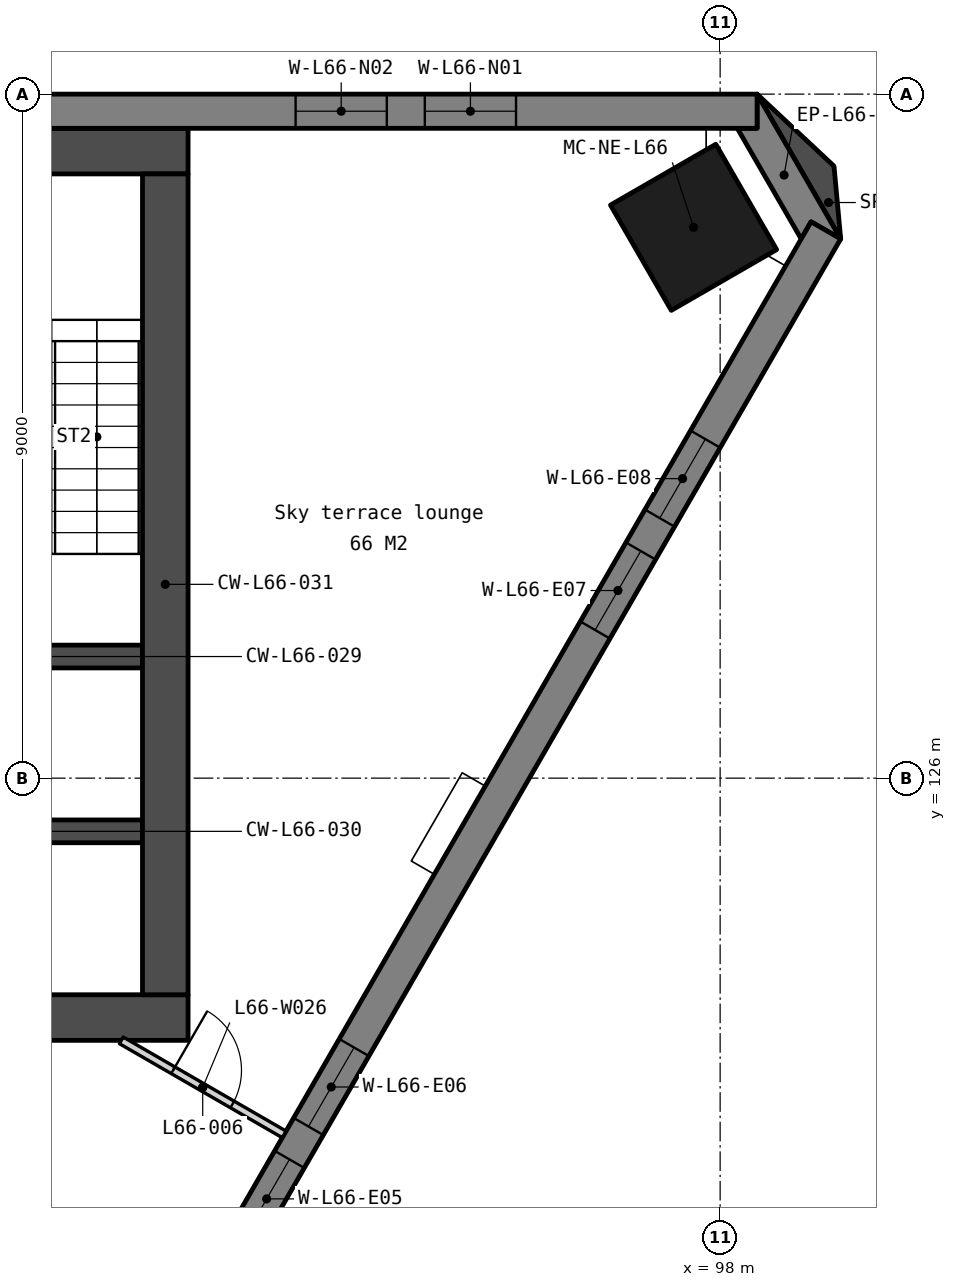
"""IFC4 building model, lengths in metres.
Left out: names, types, materials, properties, quantities, classifications, styles, units other than length and angle.
Written with IfcOpenShell. Run it as: python <this file> out.ifc"""

import sys

from ifc_helpers import new_model, si_unit, direction, frame, frame_2d, origin, origin_2d, place, context, subcontext, project, spatial, polyline, rectangle, outline, extrude, element, fill, save


model = new_model("IFC4")
c1 = context("Model", 3, precision=1e-05, world=origin(), true_north=direction((0.0, 1.0)))
c2 = subcontext(c1, "Body", "Model", "MODEL_VIEW")
j1 = project(units=[si_unit("LENGTHUNIT", "METRE"), si_unit("PLANEANGLEUNIT", "RADIAN")], contexts=[c1])
p1 = place(None, origin())
s1 = spatial("IfcSite", under=j1, at=p1, CompositionType="ELEMENT")
p2 = place(p1, origin())
s2 = spatial("IfcBuilding", under=s1, at=p2, CompositionType="ELEMENT")
p3 = place(p2, frame((0.0, 0.0, 269.9)))
s3 = spatial("IfcBuildingStorey", under=s2, at=p3, CompositionType="ELEMENT", Elevation=269.9)
p4 = place(p3, frame((97.651, 133.247, 0.0), z_axis=(0.0, 0.0, 1.0), x_axis=(-0.5, 0.866025403784, 0.0)))
e1 = element("IfcColumn", 1, at=p4, inside=s3, PredefinedType="COLUMN", context=c2, shape_type="SweptSolid", body=[
    extrude(rectangle(XDim=1.6, YDim=1.6, at=origin_2d()), origin(), (0.0, 0.0, 1.0), 3.9),
])
p5 = place(p3, frame((69.0, 134.25, 0.0), z_axis=(0.0, 0.0, 1.0), x_axis=(1.0, 0.0, 0.0)))
e2 = element("IfcWall", 2, at=p5, inside=s3, PredefinedType="SOLIDWALL", context=c2, shape_type="SweptSolid", body=[
    extrude(rectangle(XDim=22.0, YDim=0.6, at=frame_2d((11.0, 0.0))), origin(), (0.0, 0.0, 1.0), 3.75),
])
p6 = place(p3, frame((69.0, 122.85, 0.0), z_axis=(0.0, 0.0, 1.0), x_axis=(1.0, 0.0, 0.0)))
e3 = element("IfcWall", 3, at=p6, inside=s3, PredefinedType="SOLIDWALL", context=c2, shape_type="SweptSolid", body=[
    extrude(rectangle(XDim=22.0, YDim=0.6, at=frame_2d((11.0, 0.0))), origin(), (0.0, 0.0, 1.0), 3.75),
])
p7 = place(p6, frame((16.375, 0.0, 0.0)))
e4 = element("IfcOpeningElement", 4, at=p7, cuts=e3, PredefinedType="OPENING", context=c2, shape_type="SweptSolid", body=[
    extrude(rectangle(XDim=1.8, YDim=2.1, at=frame_2d((0.9, 1.05))), frame((0.0, 0.31, 0.0), z_axis=(0.0, -1.0, 0.0), x_axis=(1.0, 0.0, 0.0)), (0.0, 0.0, 1.0), 0.62),
])
p8 = place(p6, frame((3.825, 0.0, 0.0)))
e5 = element("IfcOpeningElement", 5, at=p8, cuts=e3, PredefinedType="OPENING", context=c2, shape_type="SweptSolid", body=[
    extrude(rectangle(XDim=1.8, YDim=2.1, at=frame_2d((0.9, 1.05))), frame((0.0, 0.31, 0.0), z_axis=(0.0, -1.0, 0.0), x_axis=(1.0, 0.0, 0.0)), (0.0, 0.0, 1.0), 0.62),
])
p9 = place(p6, frame((12.85, 0.0, 0.0)))
e6 = element("IfcOpeningElement", 6, at=p9, cuts=e3, PredefinedType="OPENING", context=c2, shape_type="SweptSolid", body=[
    extrude(rectangle(XDim=1.5, YDim=2.1, at=frame_2d((0.75, 1.05))), frame((0.0, 0.31, 0.0), z_axis=(0.0, -1.0, 0.0), x_axis=(1.0, 0.0, 0.0)), (0.0, 0.0, 1.0), 0.62),
])
for number, where, z_axis, x_axis in (
    (7, (87.85, 127.6, 0.0), (0.0, 0.0, 1.0), (1.0, 0.0, 0.0)),
    (8, (87.85, 125.3, 0.0), (0.0, 0.0, 1.0), (1.0, 0.0, 0.0)),
):
    element("IfcWall", number, at=place(p3, frame(where, z_axis=z_axis, x_axis=x_axis)), inside=s3, PredefinedType="SOLIDWALL", context=c2, shape_type="SweptSolid", body=[
        extrude(rectangle(XDim=2.55, YDim=0.3, at=frame_2d((1.275, 0.0))), origin(), (0.0, 0.0, 1.0), 3.75),
    ])
p10 = place(p3, frame((90.7, 133.95, 0.0), z_axis=(0.0, 0.0, 1.0), x_axis=(0.0, -1.0, 0.0)))
e9 = element("IfcWall", 9, at=p10, inside=s3, PredefinedType="SOLIDWALL", context=c2, shape_type="SweptSolid", body=[
    extrude(rectangle(XDim=10.8, YDim=0.6, at=frame_2d((5.4, 0.0))), origin(), (0.0, 0.0, 1.0), 3.75),
])
p11 = place(p3, frame((0.0, 0.0, -0.15)))
e10 = element("IfcWall", 10, at=p11, inside=s3, PredefinedType="SOLIDWALL", context=c2, shape_type="SweptSolid", body=[
    extrude(outline(polyline([(99.586, 133.095), (99.197, 133.32), (99.067, 133.095), (98.226, 134.55), (98.486, 134.55), (98.486, 135.0), (99.586, 133.095)])), origin(), (0.0, 0.0, 1.0), 3.9),
])
p12 = place(p3, frame((98.486, 134.775, -0.15), z_axis=(0.0, 0.0, 1.0), x_axis=(-1.0, 0.0, 0.0)))
e11 = element("IfcWall", 11, at=p12, inside=s3, PredefinedType="SOLIDWALL", context=c2, shape_type="SweptSolid", body=[
    extrude(outline(polyline([(36.972, 0.0), (36.972, 3.9), (0.0, 3.9), (0.0, 0.0), (36.972, 0.0)])), frame((0.0, 0.225, 0.0), z_axis=(0.0, -1.0, 0.0), x_axis=(1.0, 0.0, 0.0)), (0.0, 0.0, 1.0), 0.45),
])
p13 = place(p12, frame((3.172, 0.0, 0.95)))
e12 = element("IfcOpeningElement", 12, at=p13, cuts=e11, PredefinedType="OPENING", context=c2, shape_type="SweptSolid", body=[
    extrude(rectangle(XDim=1.2, YDim=2.2, at=frame_2d((0.6, 1.1))), frame((0.0, 0.235, 0.0), z_axis=(0.0, -1.0, 0.0), x_axis=(1.0, 0.0, 0.0)), (0.0, 0.0, 1.0), 0.47),
])
p14 = place(p12, frame((4.872, 0.0, 0.95)))
e13 = element("IfcOpeningElement", 13, at=p14, cuts=e11, PredefinedType="OPENING", context=c2, shape_type="SweptSolid", body=[
    extrude(rectangle(XDim=1.2, YDim=2.2, at=frame_2d((0.6, 1.1))), frame((0.0, 0.235, 0.0), z_axis=(0.0, -1.0, 0.0), x_axis=(1.0, 0.0, 0.0)), (0.0, 0.0, 1.0), 0.47),
])
p15 = place(p12, frame((12.415, 0.0, 0.95)))
e14 = element("IfcOpeningElement", 14, at=p15, cuts=e11, PredefinedType="OPENING", context=c2, shape_type="SweptSolid", body=[
    extrude(rectangle(XDim=1.2, YDim=2.2, at=frame_2d((0.6, 1.1))), frame((0.0, 0.235, 0.0), z_axis=(0.0, -1.0, 0.0), x_axis=(1.0, 0.0, 0.0)), (0.0, 0.0, 1.0), 0.47),
])
p16 = place(p12, frame((14.115, 0.0, 0.95)))
e15 = element("IfcOpeningElement", 15, at=p16, cuts=e11, PredefinedType="OPENING", context=c2, shape_type="SweptSolid", body=[
    extrude(rectangle(XDim=1.2, YDim=2.2, at=frame_2d((0.6, 1.1))), frame((0.0, 0.235, 0.0), z_axis=(0.0, -1.0, 0.0), x_axis=(1.0, 0.0, 0.0)), (0.0, 0.0, 1.0), 0.47),
])
p17 = place(p12, frame((21.658, 0.0, 0.95)))
e16 = element("IfcOpeningElement", 16, at=p17, cuts=e11, PredefinedType="OPENING", context=c2, shape_type="SweptSolid", body=[
    extrude(rectangle(XDim=1.2, YDim=2.2, at=frame_2d((0.6, 1.1))), frame((0.0, 0.235, 0.0), z_axis=(0.0, -1.0, 0.0), x_axis=(1.0, 0.0, 0.0)), (0.0, 0.0, 1.0), 0.47),
])
p18 = place(p12, frame((23.358, 0.0, 0.95)))
e17 = element("IfcOpeningElement", 17, at=p18, cuts=e11, PredefinedType="OPENING", context=c2, shape_type="SweptSolid", body=[
    extrude(rectangle(XDim=1.2, YDim=2.2, at=frame_2d((0.6, 1.1))), frame((0.0, 0.235, 0.0), z_axis=(0.0, -1.0, 0.0), x_axis=(1.0, 0.0, 0.0)), (0.0, 0.0, 1.0), 0.47),
])
p19 = place(p12, frame((30.901, 0.0, 0.95)))
e18 = element("IfcOpeningElement", 18, at=p19, cuts=e11, PredefinedType="OPENING", context=c2, shape_type="SweptSolid", body=[
    extrude(rectangle(XDim=1.2, YDim=2.2, at=frame_2d((0.6, 1.1))), frame((0.0, 0.235, 0.0), z_axis=(0.0, -1.0, 0.0), x_axis=(1.0, 0.0, 0.0)), (0.0, 0.0, 1.0), 0.47),
])
p20 = place(p12, frame((32.601, 0.0, 0.95)))
e19 = element("IfcOpeningElement", 19, at=p20, cuts=e11, PredefinedType="OPENING", context=c2, shape_type="SweptSolid", body=[
    extrude(rectangle(XDim=1.2, YDim=2.2, at=frame_2d((0.6, 1.1))), frame((0.0, 0.235, 0.0), z_axis=(0.0, -1.0, 0.0), x_axis=(1.0, 0.0, 0.0)), (0.0, 0.0, 1.0), 0.47),
])
p21 = place(p3, frame((80.905, 101.188, -0.15), z_axis=(0.0, 0.0, 1.0), x_axis=(0.500002536638, 0.866023939251, 0.0)))
e20 = element("IfcWall", 20, at=p21, inside=s3, PredefinedType="SOLIDWALL", context=c2, shape_type="SweptSolid", body=[
    extrude(outline(polyline([(36.972, 0.0), (36.972, 3.9), (0.0, 3.9), (0.0, 0.0), (36.972, 0.0)])), frame((0.0, 0.225, 0.0), z_axis=(0.0, -1.0, 0.0), x_axis=(1.0, 0.0, 0.0)), (0.0, 0.0, 1.0), 0.45),
])
p22 = place(p21, frame((3.172, 0.0, 0.95)))
e21 = element("IfcOpeningElement", 21, at=p22, cuts=e20, PredefinedType="OPENING", context=c2, shape_type="SweptSolid", body=[
    extrude(rectangle(XDim=1.2, YDim=2.2, at=frame_2d((0.6, 1.1))), frame((0.0, 0.235, 0.0), z_axis=(0.0, -1.0, 0.0), x_axis=(1.0, 0.0, 0.0)), (0.0, 0.0, 1.0), 0.47),
])
p23 = place(p21, frame((4.872, 0.0, 0.95)))
e22 = element("IfcOpeningElement", 22, at=p23, cuts=e20, PredefinedType="OPENING", context=c2, shape_type="SweptSolid", body=[
    extrude(rectangle(XDim=1.2, YDim=2.2, at=frame_2d((0.6, 1.1))), frame((0.0, 0.235, 0.0), z_axis=(0.0, -1.0, 0.0), x_axis=(1.0, 0.0, 0.0)), (0.0, 0.0, 1.0), 0.47),
])
p24 = place(p21, frame((12.415, 0.0, 0.95)))
e23 = element("IfcOpeningElement", 23, at=p24, cuts=e20, PredefinedType="OPENING", context=c2, shape_type="SweptSolid", body=[
    extrude(rectangle(XDim=1.2, YDim=2.2, at=frame_2d((0.6, 1.1))), frame((0.0, 0.235, 0.0), z_axis=(0.0, -1.0, 0.0), x_axis=(1.0, 0.0, 0.0)), (0.0, 0.0, 1.0), 0.47),
])
p25 = place(p21, frame((14.115, 0.0, 0.95)))
e24 = element("IfcOpeningElement", 24, at=p25, cuts=e20, PredefinedType="OPENING", context=c2, shape_type="SweptSolid", body=[
    extrude(rectangle(XDim=1.2, YDim=2.2, at=frame_2d((0.6, 1.1))), frame((0.0, 0.235, 0.0), z_axis=(0.0, -1.0, 0.0), x_axis=(1.0, 0.0, 0.0)), (0.0, 0.0, 1.0), 0.47),
])
p26 = place(p21, frame((21.658, 0.0, 0.95)))
e25 = element("IfcOpeningElement", 25, at=p26, cuts=e20, PredefinedType="OPENING", context=c2, shape_type="SweptSolid", body=[
    extrude(rectangle(XDim=1.2, YDim=2.2, at=frame_2d((0.6, 1.1))), frame((0.0, 0.235, 0.0), z_axis=(0.0, -1.0, 0.0), x_axis=(1.0, 0.0, 0.0)), (0.0, 0.0, 1.0), 0.47),
])
p27 = place(p21, frame((23.358, 0.0, 0.95)))
e26 = element("IfcOpeningElement", 26, at=p27, cuts=e20, PredefinedType="OPENING", context=c2, shape_type="SweptSolid", body=[
    extrude(rectangle(XDim=1.2, YDim=2.2, at=frame_2d((0.6, 1.1))), frame((0.0, 0.235, 0.0), z_axis=(0.0, -1.0, 0.0), x_axis=(1.0, 0.0, 0.0)), (0.0, 0.0, 1.0), 0.47),
])
p28 = place(p21, frame((30.901, 0.0, 0.95)))
e27 = element("IfcOpeningElement", 27, at=p28, cuts=e20, PredefinedType="OPENING", context=c2, shape_type="SweptSolid", body=[
    extrude(rectangle(XDim=1.2, YDim=2.2, at=frame_2d((0.6, 1.1))), frame((0.0, 0.235, 0.0), z_axis=(0.0, -1.0, 0.0), x_axis=(1.0, 0.0, 0.0)), (0.0, 0.0, 1.0), 0.47),
])
p29 = place(p21, frame((32.601, 0.0, 0.95)))
e28 = element("IfcOpeningElement", 28, at=p29, cuts=e20, PredefinedType="OPENING", context=c2, shape_type="SweptSolid", body=[
    extrude(rectangle(XDim=1.2, YDim=2.2, at=frame_2d((0.6, 1.1))), frame((0.0, 0.235, 0.0), z_axis=(0.0, -1.0, 0.0), x_axis=(1.0, 0.0, 0.0)), (0.0, 0.0, 1.0), 0.47),
])
p30 = place(p3, frame((0.0, 0.0, -0.15)))
e29 = element("IfcWall", 29, at=p30, inside=s3, PredefinedType="SOLIDWALL", context=c2, shape_type="SweptSolid", body=[
    extrude(outline(polyline([(99.586, 133.095), (99.498, 134.052), (98.486, 135.0), (99.586, 133.095)])), origin(), (0.0, 0.0, 1.0), 3.9),
])
p31 = place(p3, frame((90.121, 122.55, 0.0), z_axis=(0.0, 0.0, 1.0), x_axis=(0.86604923931, -0.499958713387, 0.0)))
e30 = element("IfcWall", 30, at=p31, inside=s3, PredefinedType="PARTITIONING", context=c2, shape_type="SweptSolid", body=[
    extrude(rectangle(XDim=2.475, YDim=0.1, at=frame_2d((1.237, 0.0))), origin(), (0.0, 0.0, 1.0), 3.75),
])
p32 = place(p31, frame((0.787, 0.0, 0.0)))
e31 = element("IfcOpeningElement", 31, at=p32, cuts=e30, PredefinedType="OPENING", context=c2, shape_type="SweptSolid", body=[
    extrude(rectangle(XDim=0.9, YDim=2.1, at=frame_2d((0.45, 1.05))), frame((0.0, 0.06, 0.0), z_axis=(0.0, -1.0, 0.0), x_axis=(1.0, 0.0, 0.0)), (0.0, 0.0, 1.0), 0.12),
])
p33 = place(p13, origin())
e32 = element("IfcWindow", 32, at=p33, inside=s3, PartitioningType="SINGLE_PANEL", PredefinedType="WINDOW", context=c2, shape_type="SweptSolid", body=[
    extrude(rectangle(XDim=1.2, YDim=2.2, at=frame_2d((0.6, 1.1))), frame((0.0, 0.03, 0.0), z_axis=(0.0, -1.0, 0.0), x_axis=(1.0, 0.0, 0.0)), (0.0, 0.0, 1.0), 0.06),
])
fill(e12, e32)
p34 = place(p14, origin())
e33 = element("IfcWindow", 33, at=p34, inside=s3, PartitioningType="SINGLE_PANEL", PredefinedType="WINDOW", context=c2, shape_type="SweptSolid", body=[
    extrude(rectangle(XDim=1.2, YDim=2.2, at=frame_2d((0.6, 1.1))), frame((0.0, 0.03, 0.0), z_axis=(0.0, -1.0, 0.0), x_axis=(1.0, 0.0, 0.0)), (0.0, 0.0, 1.0), 0.06),
])
fill(e13, e33)
p35 = place(p26, origin())
e34 = element("IfcWindow", 34, at=p35, inside=s3, PartitioningType="SINGLE_PANEL", PredefinedType="WINDOW", context=c2, shape_type="SweptSolid", body=[
    extrude(rectangle(XDim=1.2, YDim=2.2, at=frame_2d((0.6, 1.1))), frame((0.0, 0.03, 0.0), z_axis=(0.0, -1.0, 0.0), x_axis=(1.0, 0.0, 0.0)), (0.0, 0.0, 1.0), 0.06),
])
fill(e25, e34)
p36 = place(p27, origin())
e35 = element("IfcWindow", 35, at=p36, inside=s3, PartitioningType="SINGLE_PANEL", PredefinedType="WINDOW", context=c2, shape_type="SweptSolid", body=[
    extrude(rectangle(XDim=1.2, YDim=2.2, at=frame_2d((0.6, 1.1))), frame((0.0, 0.03, 0.0), z_axis=(0.0, -1.0, 0.0), x_axis=(1.0, 0.0, 0.0)), (0.0, 0.0, 1.0), 0.06),
])
fill(e26, e35)
p37 = place(p28, origin())
e36 = element("IfcWindow", 36, at=p37, inside=s3, PartitioningType="SINGLE_PANEL", PredefinedType="WINDOW", context=c2, shape_type="SweptSolid", body=[
    extrude(rectangle(XDim=1.2, YDim=2.2, at=frame_2d((0.6, 1.1))), frame((0.0, 0.03, 0.0), z_axis=(0.0, -1.0, 0.0), x_axis=(1.0, 0.0, 0.0)), (0.0, 0.0, 1.0), 0.06),
])
fill(e27, e36)
p38 = place(p29, origin())
e37 = element("IfcWindow", 37, at=p38, inside=s3, PartitioningType="SINGLE_PANEL", PredefinedType="WINDOW", context=c2, shape_type="SweptSolid", body=[
    extrude(rectangle(XDim=1.2, YDim=2.2, at=frame_2d((0.6, 1.1))), frame((0.0, 0.03, 0.0), z_axis=(0.0, -1.0, 0.0), x_axis=(1.0, 0.0, 0.0)), (0.0, 0.0, 1.0), 0.06),
])
fill(e28, e37)
p39 = place(p32, origin())
e38 = element("IfcDoor", 38, at=p39, inside=s3, OperationType="SINGLE_SWING_LEFT", PredefinedType="DOOR", context=c2, shape_type="SweptSolid", body=[
    extrude(rectangle(XDim=0.9, YDim=2.1, at=frame_2d((0.45, 1.05))), frame((0.0, 0.025, 0.0), z_axis=(0.0, -1.0, 0.0), x_axis=(1.0, 0.0, 0.0)), (0.0, 0.0, 1.0), 0.05),
])
fill(e31, e38)
save(model, sys.argv[1])
